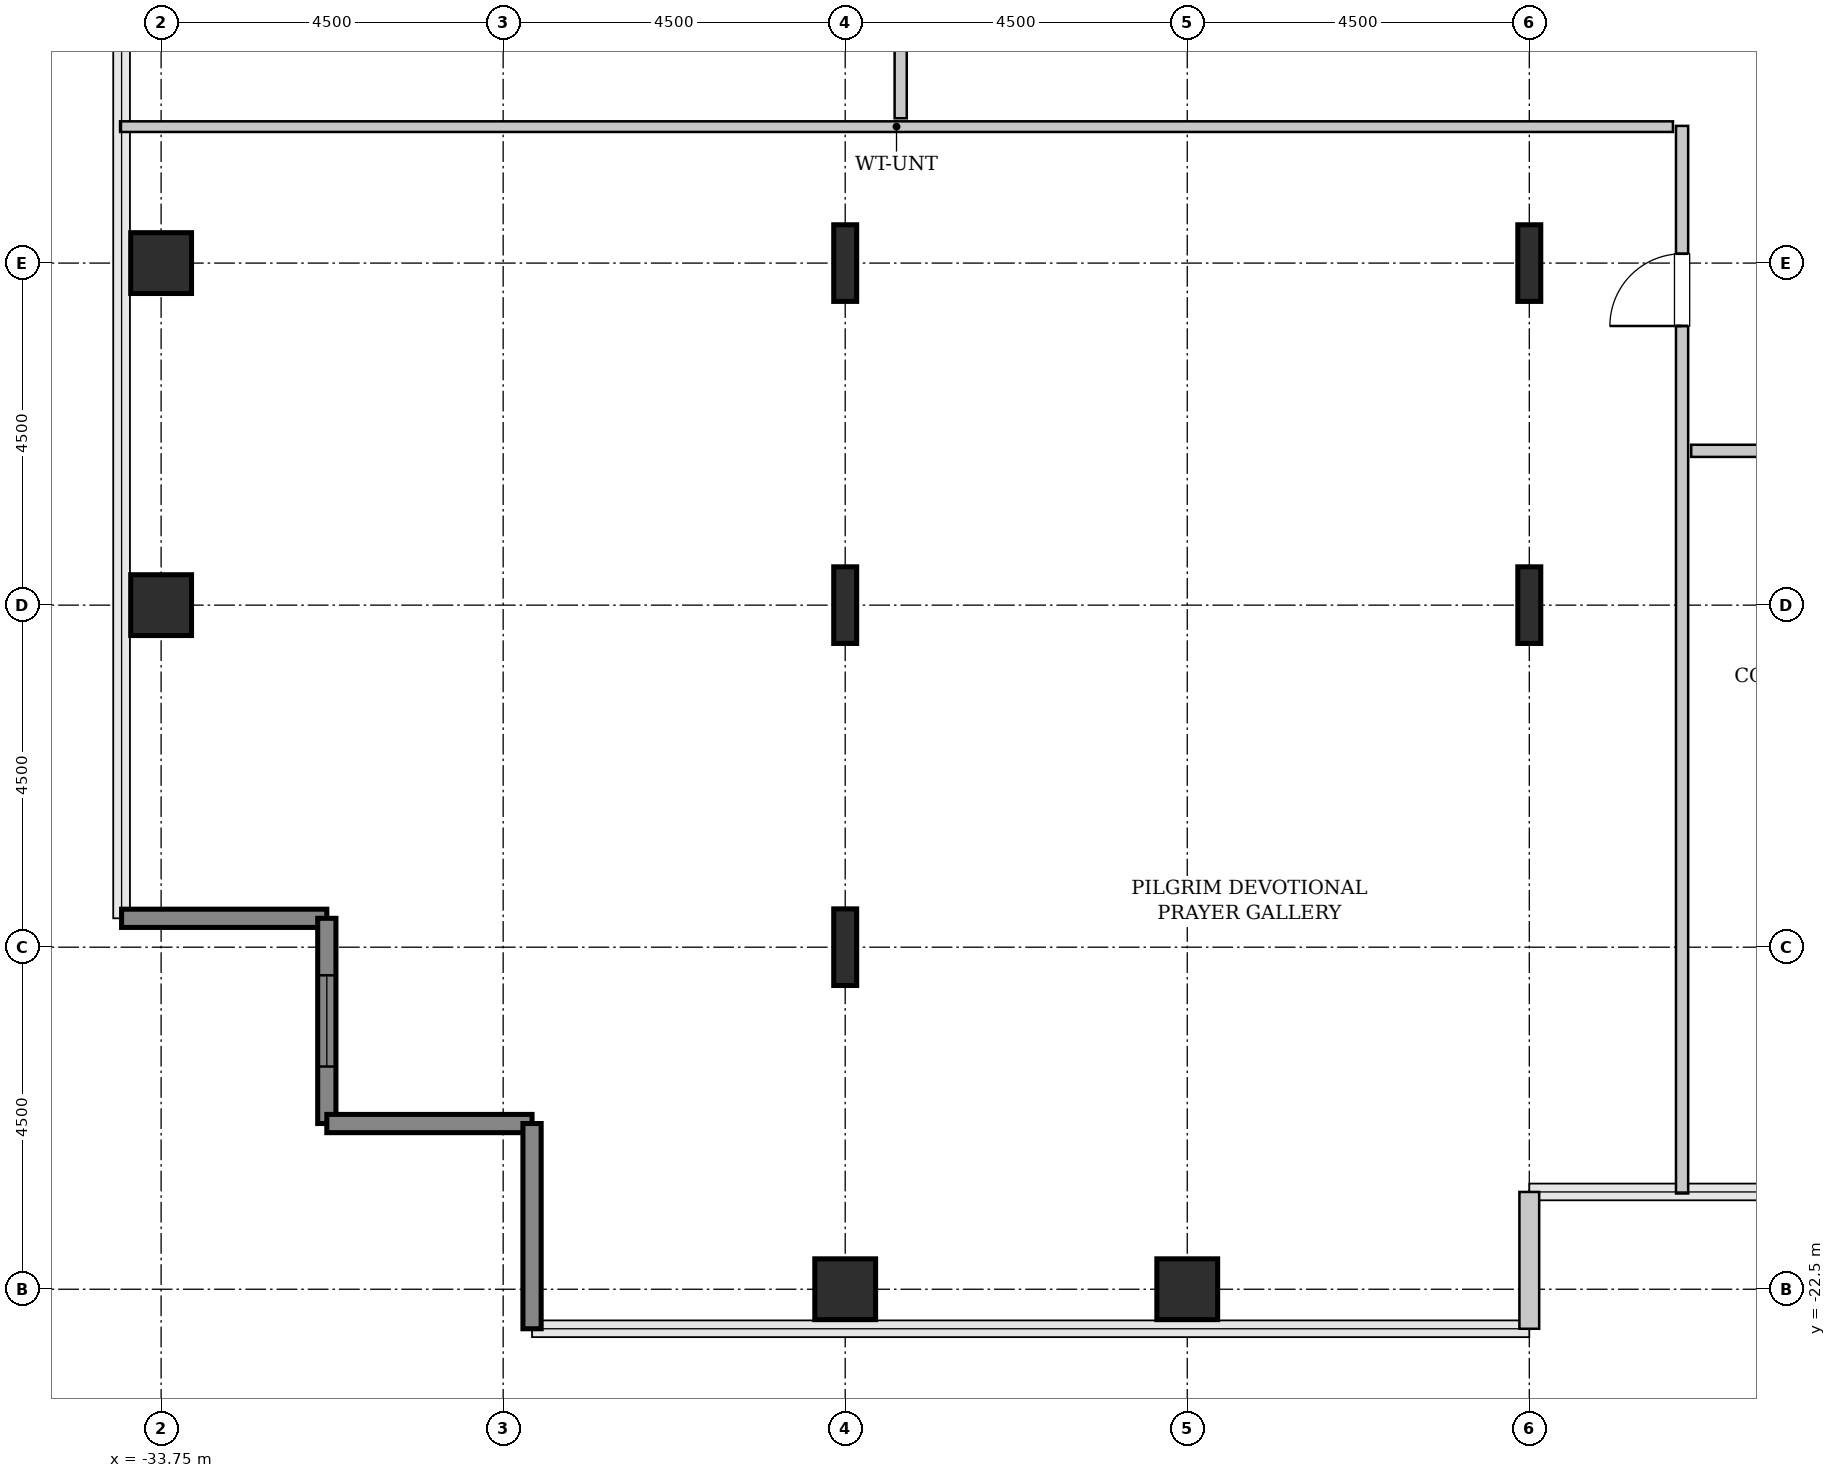
"""IFC4 building model, lengths in metres.
Left out: names, types, materials, properties, quantities, classifications, styles, units other than length and angle.
Written with IfcOpenShell. Run it as: python <this file> out.ifc"""

import sys

from ifc_helpers import new_model, si_unit, direction, frame, frame_2d, origin, origin_2d, place, context, subcontext, project, spatial, rectangle, hollow_rectangle, i_section, extrude, source, transform, mapped, element, fill, save


model = new_model("IFC4")
c1 = context("Model", 3, precision=1e-05, world=origin(), true_north=direction((0.0, 1.0)))
c2 = subcontext(c1, "Body", "Model", "MODEL_VIEW")
j1 = project(units=[si_unit("LENGTHUNIT", "METRE"), si_unit("PLANEANGLEUNIT", "RADIAN")], contexts=[c1])
p1 = place(None, origin())
s1 = spatial("IfcSite", under=j1, at=p1, CompositionType="ELEMENT")
p2 = place(p1, origin())
s2 = spatial("IfcBuilding", under=s1, at=p2, CompositionType="ELEMENT")
p3 = place(p2, frame((0.0, 0.0, 140.2)))
s3 = spatial("IfcBuildingStorey", under=s2, at=p3, CompositionType="ELEMENT", Elevation=140.2)
m1 = source(origin(), c2, "Body", "SweptSolid", [
    extrude(hollow_rectangle(XDim=0.8, YDim=0.8, WallThickness=0.04, InnerFilletRadius=0.04, OuterFilletRadius=0.08, at=origin_2d()), origin(), (0.0, 0.0, 1.0), 3.8),
])
for number, where, z_axis, x_axis in (
    (1, (-33.75, -13.5, 0.0), (0.0, 0.0, 1.0), (1.0, 0.0, 0.0)),
    (2, (-33.75, -9.0, 0.0), (0.0, 0.0, 1.0), (1.0, 0.0, 0.0)),
    (3, (-24.75, -22.5, 0.0), (0.0, 0.0, 1.0), (1.0, 0.0, 0.0)),
):
    element("IfcColumn", number, at=place(p3, frame(where, z_axis=z_axis, x_axis=x_axis)), inside=s3, PredefinedType="COLUMN", context=c2, shape_type="MappedRepresentation", body=[
        mapped(m1, transform((0.0, 0.0, 0.0), x_axis=(1.0, 0.0, 0.0), y_axis=(0.0, 1.0, 0.0), z_axis=(0.0, 0.0, 1.0), scale=1.0)),
    ])
m2 = source(origin(), c2, "Body", "SweptSolid", [
    extrude(i_section(OverallWidth=0.302, OverallDepth=1.008, WebThickness=0.021, FlangeThickness=0.04, FilletRadius=0.03, at=origin_2d()), origin(), (0.0, 0.0, 1.0), 3.8),
])
for number, where, z_axis, x_axis in (
    (4, (-24.75, -18.0, 0.0), (0.0, 0.0, 1.0), (1.0, 0.0, 0.0)),
    (5, (-24.75, -13.5, 0.0), (0.0, 0.0, 1.0), (1.0, 0.0, 0.0)),
    (6, (-24.75, -9.0, 0.0), (0.0, 0.0, 1.0), (1.0, 0.0, 0.0)),
):
    element("IfcColumn", number, at=place(p3, frame(where, z_axis=z_axis, x_axis=x_axis)), inside=s3, PredefinedType="COLUMN", context=c2, shape_type="MappedRepresentation", body=[
        mapped(m2, transform((0.0, 0.0, 0.0), x_axis=(1.0, 0.0, 0.0), y_axis=(0.0, 1.0, 0.0), z_axis=(0.0, 0.0, 1.0), scale=1.0)),
    ])
p4 = place(p3, frame((-20.25, -22.5, 0.0), z_axis=(0.0, 0.0, 1.0), x_axis=(1.0, 0.0, 0.0)))
e7 = element("IfcColumn", 7, at=p4, inside=s3, PredefinedType="COLUMN", context=c2, shape_type="MappedRepresentation", body=[
    mapped(m1, transform((0.0, 0.0, 0.0), x_axis=(1.0, 0.0, 0.0), y_axis=(0.0, 1.0, 0.0), z_axis=(0.0, 0.0, 1.0), scale=1.0)),
])
for number, where, z_axis, x_axis in (
    (8, (-15.75, -13.5, 0.0), (0.0, 0.0, 1.0), (1.0, 0.0, 0.0)),
    (9, (-15.75, -9.0, 0.0), (0.0, 0.0, 1.0), (1.0, 0.0, 0.0)),
):
    element("IfcColumn", number, at=place(p3, frame(where, z_axis=z_axis, x_axis=x_axis)), inside=s3, PredefinedType="COLUMN", context=c2, shape_type="MappedRepresentation", body=[
        mapped(m2, transform((0.0, 0.0, 0.0), x_axis=(1.0, 0.0, 0.0), y_axis=(0.0, 1.0, 0.0), z_axis=(0.0, 0.0, 1.0), scale=1.0)),
    ])
m3 = source(origin(), c2, "Body", "SweptSolid", [
    extrude(rectangle(XDim=2.7, YDim=0.24, at=frame_2d((1.35, 0.0))), origin(), (0.0, 0.0, 1.0), 3.5),
])
p5 = place(p3, frame((-34.27, -17.62, 0.0), z_axis=(0.0, 0.0, 1.0), x_axis=(1.0, 0.0, 0.0)))
e10 = element("IfcWall", 10, at=p5, inside=s3, PredefinedType="SHEAR", context=c2, shape_type="MappedRepresentation", body=[
    mapped(m3, transform((0.0, 0.0, 0.0), x_axis=(1.0, 0.0, 0.0), y_axis=(0.0, 1.0, 0.0), z_axis=(0.0, 0.0, 1.0), scale=1.0)),
])
p6 = place(p3, frame((-31.57, -17.62, 0.0), z_axis=(0.0, 0.0, 1.0), x_axis=(0.0, -1.0, 0.0)))
e11 = element("IfcWall", 11, at=p6, inside=s3, PredefinedType="SHEAR", context=c2, shape_type="MappedRepresentation", body=[
    mapped(m3, transform((0.0, 0.0, 0.0), x_axis=(1.0, 0.0, 0.0), y_axis=(0.0, 1.0, 0.0), z_axis=(0.0, 0.0, 1.0), scale=1.0)),
])
p7 = place(p6, frame((0.75, 0.0, 0.85)))
e12 = element("IfcOpeningElement", 12, at=p7, cuts=e11, PredefinedType="OPENING", context=c2, shape_type="SweptSolid", body=[
    extrude(rectangle(XDim=1.2, YDim=1.8, at=frame_2d((0.6, 0.9))), frame((0.0, 0.13, 0.0), z_axis=(0.0, -1.0, 0.0), x_axis=(1.0, 0.0, 0.0)), (0.0, 0.0, 1.0), 0.26),
])
for number, where, z_axis, x_axis in (
    (13, (-31.57, -20.32, 0.0), (0.0, 0.0, 1.0), (1.0, 0.0, 0.0)),
    (14, (-28.87, -20.32, 0.0), (0.0, 0.0, 1.0), (0.0, -1.0, 0.0)),
):
    element("IfcWall", number, at=place(p3, frame(where, z_axis=z_axis, x_axis=x_axis)), inside=s3, PredefinedType="SHEAR", context=c2, shape_type="MappedRepresentation", body=[
        mapped(m3, transform((0.0, 0.0, 0.0), x_axis=(1.0, 0.0, 0.0), y_axis=(0.0, 1.0, 0.0), z_axis=(0.0, 0.0, 1.0), scale=1.0)),
    ])
m4 = source(origin(), c2, "Body", "SweptSolid", [
    extrude(rectangle(XDim=1.8, YDim=0.26, at=frame_2d((0.9, 0.0))), origin(), (0.0, 0.0, 1.0), 3.5),
])
p8 = place(p3, frame((-15.75, -23.02, 0.0), z_axis=(0.0, 0.0, 1.0), x_axis=(0.0, 1.0, 0.0)))
e15 = element("IfcWall", 15, at=p8, inside=s3, PredefinedType="SOLIDWALL", context=c2, shape_type="MappedRepresentation", body=[
    mapped(m4, transform((0.0, 0.0, 0.0), x_axis=(1.0, 0.0, 0.0), y_axis=(0.0, 1.0, 0.0), z_axis=(0.0, 0.0, 1.0), scale=1.0)),
])
m5 = source(origin(), c2, "Body", "SweptSolid", [
    extrude(rectangle(XDim=14.045, YDim=0.16, at=frame_2d((7.022, 0.0))), origin(), (0.0, 0.0, 1.0), 3.485),
])
p9 = place(p3, frame((-13.74, -21.24, 0.0), z_axis=(0.0, 0.0, 1.0), x_axis=(0.0, 1.0, 0.0)))
e16 = element("IfcWall", 16, at=p9, inside=s3, PredefinedType="PARTITIONING", context=c2, shape_type="MappedRepresentation", body=[
    mapped(m5, transform((0.0, 0.0, 0.0), x_axis=(1.0, 0.0, 0.0), y_axis=(0.0, 1.0, 0.0), z_axis=(0.0, 0.0, 1.0), scale=1.0)),
])
p10 = place(p9, frame((11.413, 0.0, 0.0)))
e17 = element("IfcOpeningElement", 17, at=p10, cuts=e16, PredefinedType="OPENING", context=c2, shape_type="SweptSolid", body=[
    extrude(rectangle(XDim=0.95, YDim=2.1, at=frame_2d((0.475, 1.05))), frame((0.0, 0.09, 0.0), z_axis=(0.0, -1.0, 0.0), x_axis=(1.0, 0.0, 0.0)), (0.0, 0.0, 1.0), 0.18),
])
m6 = source(origin(), c2, "Body", "SweptSolid", [
    extrude(rectangle(XDim=20.43, YDim=0.14, at=frame_2d((10.215, 0.0))), origin(), (0.0, 0.0, 1.0), 3.485),
])
p11 = place(p3, frame((-34.29, -7.205, 0.0), z_axis=(0.0, 0.0, 1.0), x_axis=(1.0, 0.0, 0.0)))
e18 = element("IfcWall", 18, at=p11, inside=s3, PredefinedType="PARTITIONING", context=c2, shape_type="MappedRepresentation", body=[
    mapped(m6, transform((0.0, 0.0, 0.0), x_axis=(1.0, 0.0, 0.0), y_axis=(0.0, 1.0, 0.0), z_axis=(0.0, 0.0, 1.0), scale=1.0)),
])
m7 = source(origin(), c2, "Body", "SweptSolid", [
    extrude(rectangle(XDim=14.883, YDim=0.16, at=frame_2d((7.441, 0.0))), origin(), (0.0, 0.0, 1.0), 3.485),
])
p12 = place(p3, frame((-24.02, -7.095, 0.0), z_axis=(0.0, 0.0, 1.0), x_axis=(0.0, 1.0, 0.0)))
e19 = element("IfcWall", 19, at=p12, inside=s3, PredefinedType="PARTITIONING", context=c2, shape_type="MappedRepresentation", body=[
    mapped(m7, transform((0.0, 0.0, 0.0), x_axis=(1.0, 0.0, 0.0), y_axis=(0.0, 1.0, 0.0), z_axis=(0.0, 0.0, 1.0), scale=1.0)),
])
p13 = place(p12, frame((4.37, 0.0, 0.0)))
e20 = element("IfcOpeningElement", 20, at=p13, cuts=e19, PredefinedType="OPENING", context=c2, shape_type="SweptSolid", body=[
    extrude(rectangle(XDim=0.95, YDim=2.1, at=frame_2d((0.475, 1.05))), frame((0.0, 0.09, 0.0), z_axis=(0.0, -1.0, 0.0), x_axis=(1.0, 0.0, 0.0)), (0.0, 0.0, 1.0), 0.18),
])
m8 = source(origin(), c2, "Body", "SweptSolid", [
    extrude(rectangle(XDim=3.625, YDim=0.16, at=frame_2d((1.812, 0.0))), origin(), (0.0, 0.0, 1.0), 3.485),
])
p14 = place(p3, frame((-13.62, -11.47, 0.0), z_axis=(0.0, 0.0, 1.0), x_axis=(1.0, 0.0, 0.0)))
e21 = element("IfcWall", 21, at=p14, inside=s3, PredefinedType="PARTITIONING", context=c2, shape_type="MappedRepresentation", body=[
    mapped(m8, transform((0.0, 0.0, 0.0), x_axis=(1.0, 0.0, 0.0), y_axis=(0.0, 1.0, 0.0), z_axis=(0.0, 0.0, 1.0), scale=1.0)),
])
p15 = place(p14, frame((1.337, 0.0, 0.0)))
e22 = element("IfcOpeningElement", 22, at=p15, cuts=e21, PredefinedType="OPENING", context=c2, shape_type="SweptSolid", body=[
    extrude(rectangle(XDim=0.95, YDim=2.1, at=frame_2d((0.475, 1.05))), frame((0.0, 0.09, 0.0), z_axis=(0.0, -1.0, 0.0), x_axis=(1.0, 0.0, 0.0)), (0.0, 0.0, 1.0), 0.18),
])
m9 = source(origin(), c2, "Body", "SweptSolid", [
    extrude(rectangle(XDim=1.2, YDim=1.8, at=frame_2d((0.6, 0.9))), frame((0.0, 0.03, 0.0), z_axis=(0.0, -1.0, 0.0), x_axis=(1.0, 0.0, 0.0)), (0.0, 0.0, 1.0), 0.06),
])
p16 = place(p7, origin())
e23 = element("IfcWindow", 23, at=p16, inside=s3, PartitioningType="SINGLE_PANEL", PredefinedType="WINDOW", context=c2, shape_type="MappedRepresentation", body=[
    mapped(m9, transform((0.0, 0.0, 0.0), x_axis=(1.0, 0.0, 0.0), y_axis=(0.0, 1.0, 0.0), z_axis=(0.0, 0.0, 1.0), scale=1.0)),
])
fill(e12, e23)
m10 = source(origin(), c2, "Body", "SweptSolid", [
    extrude(rectangle(XDim=0.95, YDim=2.1, at=frame_2d((0.475, 1.05))), frame((0.0, 0.025, 0.0), z_axis=(0.0, -1.0, 0.0), x_axis=(1.0, 0.0, 0.0)), (0.0, 0.0, 1.0), 0.05),
])
p17 = place(p10, origin())
e24 = element("IfcDoor", 24, at=p17, inside=s3, OperationType="SINGLE_SWING_LEFT", PredefinedType="DOOR", context=c2, shape_type="MappedRepresentation", body=[
    mapped(m10, transform((0.0, 0.0, 0.0), x_axis=(1.0, 0.0, 0.0), y_axis=(0.0, 1.0, 0.0), z_axis=(0.0, 0.0, 1.0), scale=1.0)),
])
fill(e17, e24)
save(model, sys.argv[1])
